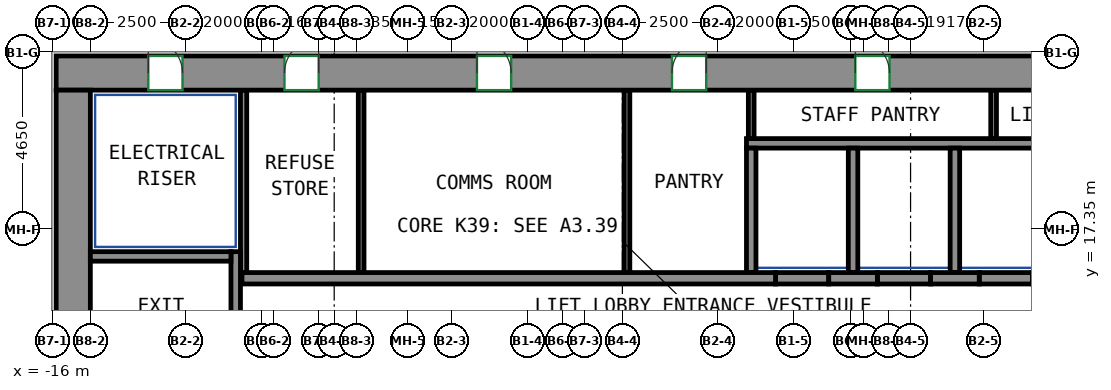
"""IFC4 building model, lengths in metres.
Left out: names, types, materials, properties, quantities, classifications, styles, units other than length and angle.
Written with IfcOpenShell. Run it as: python <this file> out.ifc"""

import sys

from ifc_helpers import new_model, si_unit, direction, frame, frame_2d, origin, place, context, subcontext, project, spatial, rectangle, extrude, source, transform, mapped, element, fill, save


model = new_model("IFC4")
c1 = context("Model", 3, precision=1e-05, world=origin(), true_north=direction((0.0, 1.0)))
c2 = subcontext(c1, "Body", "Model", "MODEL_VIEW")
j1 = project(units=[si_unit("LENGTHUNIT", "METRE"), si_unit("PLANEANGLEUNIT", "RADIAN")], contexts=[c1])
p1 = place(None, origin())
s1 = spatial("IfcSite", under=j1, at=p1, CompositionType="ELEMENT")
p2 = place(p1, origin())
s2 = spatial("IfcBuilding", under=s1, at=p2, CompositionType="ELEMENT")
p3 = place(p2, frame((0.0, 0.0, 164.3)))
s3 = spatial("IfcBuildingStorey", under=s2, at=p3, CompositionType="ELEMENT", Elevation=164.3)
m1 = source(origin(), c2, "Body", "SweptSolid", [
    extrude(rectangle(XDim=33.9, YDim=0.9, at=frame_2d((16.95, 0.0))), origin(), (0.0, 0.0, 1.0), 3.8),
])
p4 = place(p3, frame((-15.9, 21.45, 0.0), z_axis=(0.0, 0.0, 1.0), x_axis=(1.0, 0.0, 0.0)))
e1 = element("IfcWall", 1, at=p4, inside=s3, PredefinedType="SHEAR", context=c2, shape_type="MappedRepresentation", body=[
    mapped(m1, transform((0.0, 0.0, 0.0))),
])
p5 = place(p4, frame((6.008, 0.0, 0.0)))
e2 = element("IfcOpeningElement", 2, at=p5, cuts=e1, PredefinedType="OPENING", context=c2, shape_type="SweptSolid", body=[
    extrude(rectangle(XDim=0.9, YDim=2.1, at=frame_2d((0.45, 1.05))), frame((0.0, 0.46, 0.0), z_axis=(0.0, -1.0, 0.0), x_axis=(1.0, 0.0, 0.0)), (0.0, 0.0, 1.0), 0.92),
])
p6 = place(p4, frame((11.073, 0.0, 0.0)))
e3 = element("IfcOpeningElement", 3, at=p6, cuts=e1, PredefinedType="OPENING", context=c2, shape_type="SweptSolid", body=[
    extrude(rectangle(XDim=0.9, YDim=2.1, at=frame_2d((0.45, 1.05))), frame((0.0, 0.46, 0.0), z_axis=(0.0, -1.0, 0.0), x_axis=(1.0, 0.0, 0.0)), (0.0, 0.0, 1.0), 0.92),
])
p7 = place(p4, frame((16.205, 0.0, 0.0)))
e4 = element("IfcOpeningElement", 4, at=p7, cuts=e1, PredefinedType="OPENING", context=c2, shape_type="SweptSolid", body=[
    extrude(rectangle(XDim=0.9, YDim=2.1, at=frame_2d((0.45, 1.05))), frame((0.0, 0.46, 0.0), z_axis=(0.0, -1.0, 0.0), x_axis=(1.0, 0.0, 0.0)), (0.0, 0.0, 1.0), 0.92),
])
p8 = place(p4, frame((21.029, 0.0, 0.0)))
e5 = element("IfcOpeningElement", 5, at=p8, cuts=e1, PredefinedType="OPENING", context=c2, shape_type="SweptSolid", body=[
    extrude(rectangle(XDim=0.9, YDim=2.1, at=frame_2d((0.45, 1.05))), frame((0.0, 0.46, 0.0), z_axis=(0.0, -1.0, 0.0), x_axis=(1.0, 0.0, 0.0)), (0.0, 0.0, 1.0), 0.92),
])
p9 = place(p4, frame((26.389, 0.0, 0.0)))
e6 = element("IfcOpeningElement", 6, at=p9, cuts=e1, PredefinedType="OPENING", context=c2, shape_type="SweptSolid", body=[
    extrude(rectangle(XDim=0.9, YDim=2.1, at=frame_2d((0.45, 1.05))), frame((0.0, 0.46, 0.0), z_axis=(0.0, -1.0, 0.0), x_axis=(1.0, 0.0, 0.0)), (0.0, 0.0, 1.0), 0.92),
])
p10 = place(p4, frame((2.425, 0.0, 0.0)))
e7 = element("IfcOpeningElement", 7, at=p10, cuts=e1, PredefinedType="OPENING", context=c2, shape_type="SweptSolid", body=[
    extrude(rectangle(XDim=0.9, YDim=2.1, at=frame_2d((0.45, 1.05))), frame((0.0, 0.46, 0.0), z_axis=(0.0, -1.0, 0.0), x_axis=(1.0, 0.0, 0.0)), (0.0, 0.0, 1.0), 0.92),
])
p11 = place(p4, frame((30.575, 0.0, 0.0)))
e8 = element("IfcOpeningElement", 8, at=p11, cuts=e1, PredefinedType="OPENING", context=c2, shape_type="SweptSolid", body=[
    extrude(rectangle(XDim=0.9, YDim=2.1, at=frame_2d((0.45, 1.05))), frame((0.0, 0.46, 0.0), z_axis=(0.0, -1.0, 0.0), x_axis=(1.0, 0.0, 0.0)), (0.0, 0.0, 1.0), 0.92),
])
m2 = source(origin(), c2, "Body", "SweptSolid", [
    extrude(rectangle(XDim=12.0, YDim=0.9, at=frame_2d((6.0, 0.0))), origin(), (0.0, 0.0, 1.0), 3.8),
])
p12 = place(p3, frame((-15.45, 9.0, 0.0), z_axis=(0.0, 0.0, 1.0), x_axis=(0.0, 1.0, 0.0)))
e9 = element("IfcWall", 9, at=p12, inside=s3, PredefinedType="SHEAR", context=c2, shape_type="MappedRepresentation", body=[
    mapped(m2, transform((0.0, 0.0, 0.0))),
])
m3 = source(origin(), c2, "Body", "SweptSolid", [
    extrude(rectangle(XDim=7.75, YDim=0.25, at=frame_2d((3.875, 0.0))), origin(), (0.0, 0.0, 1.0), 3.8),
])
p13 = place(p3, frame((-11.175, 9.0, 0.0), z_axis=(0.0, 0.0, 1.0), x_axis=(0.0, 1.0, 0.0)))
e10 = element("IfcWall", 10, at=p13, inside=s3, PredefinedType="SHEAR", context=c2, shape_type="MappedRepresentation", body=[
    mapped(m3, transform((0.0, 0.0, 0.0))),
])
m4 = source(origin(), c2, "Body", "SweptSolid", [
    extrude(rectangle(XDim=3.7, YDim=0.25, at=frame_2d((1.85, 0.0))), origin(), (0.0, 0.0, 1.0), 3.8),
])
p14 = place(p3, frame((-15.0, 16.625, 0.0), z_axis=(0.0, 0.0, 1.0), x_axis=(1.0, 0.0, 0.0)))
e11 = element("IfcWall", 11, at=p14, inside=s3, PredefinedType="SHEAR", context=c2, shape_type="MappedRepresentation", body=[
    mapped(m4, transform((0.0, 0.0, 0.0))),
])
m5 = source(origin(), c2, "Body", "SweptSolid", [
    extrude(rectangle(XDim=14.04, YDim=0.3, at=frame_2d((7.02, 0.0))), origin(), (0.0, 0.0, 1.0), 3.8),
])
p15 = place(p3, frame((-11.01, 16.05, 0.0), z_axis=(0.0, 0.0, 1.0), x_axis=(1.0, 0.0, 0.0)))
e12 = element("IfcWall", 12, at=p15, inside=s3, PredefinedType="SHEAR", context=c2, shape_type="MappedRepresentation", body=[
    mapped(m5, transform((0.0, 0.0, 0.0))),
])
m6 = source(origin(), c2, "Body", "SweptSolid", [
    extrude(rectangle(XDim=1.28, YDim=0.3, at=frame_2d((0.64, 0.0))), origin(), (0.0, 0.0, 1.0), 3.8),
])
p16 = place(p3, frame((4.43, 16.05, 0.0), z_axis=(0.0, 0.0, 1.0), x_axis=(1.0, 0.0, 0.0)))
e13 = element("IfcWall", 13, at=p16, inside=s3, PredefinedType="SHEAR", context=c2, shape_type="MappedRepresentation", body=[
    mapped(m6, transform((0.0, 0.0, 0.0))),
])
m7 = source(origin(), c2, "Body", "SweptSolid", [
    extrude(rectangle(XDim=1.28, YDim=0.3, at=frame_2d((0.64, 0.0))), origin(), (0.0, 0.0, 1.0), 3.8),
])
p17 = place(p3, frame((7.11, 16.05, 0.0), z_axis=(0.0, 0.0, 1.0), x_axis=(1.0, 0.0, 0.0)))
e14 = element("IfcWall", 14, at=p17, inside=s3, PredefinedType="SHEAR", context=c2, shape_type="MappedRepresentation", body=[
    mapped(m7, transform((0.0, 0.0, 0.0))),
])
m8 = source(origin(), c2, "Body", "SweptSolid", [
    extrude(rectangle(XDim=1.4, YDim=0.3, at=frame_2d((0.7, 0.0))), origin(), (0.0, 0.0, 1.0), 3.8),
])
p18 = place(p3, frame((3.03, 16.05, 0.0), z_axis=(0.0, 0.0, 1.0), x_axis=(1.0, 0.0, 0.0)))
e15 = element("IfcWall", 15, at=p18, inside=s3, PredefinedType="PARTITIONING", context=c2, shape_type="MappedRepresentation", body=[
    mapped(m8, transform((0.0, 0.0, 0.0))),
])
m9 = source(origin(), c2, "Body", "SweptSolid", [
    extrude(rectangle(XDim=1.4, YDim=0.3, at=frame_2d((0.7, 0.0))), origin(), (0.0, 0.0, 1.0), 3.8),
])
for number, where, z_axis, x_axis in (
    (16, (5.71, 16.05, 0.0), (0.0, 0.0, 1.0), (1.0, 0.0, 0.0)),
    (17, (8.39, 16.05, 0.0), (0.0, 0.0, 1.0), (1.0, 0.0, 0.0)),
):
    element("IfcWall", number, at=place(p3, frame(where, z_axis=z_axis, x_axis=x_axis)), inside=s3, PredefinedType="PARTITIONING", context=c2, shape_type="MappedRepresentation", body=[
        mapped(m9, transform((0.0, 0.0, 0.0))),
    ])
m10 = source(origin(), c2, "Body", "SweptSolid", [
    extrude(rectangle(XDim=10.97, YDim=0.25, at=frame_2d((5.485, 0.0))), origin(), (0.0, 0.0, 1.0), 3.8),
])
p19 = place(p3, frame((2.265, 19.6, 0.0), z_axis=(0.0, 0.0, 1.0), x_axis=(1.0, 0.0, 0.0)))
e18 = element("IfcWall", 18, at=p19, inside=s3, PredefinedType="PARTITIONING", context=c2, shape_type="MappedRepresentation", body=[
    mapped(m10, transform((0.0, 0.0, 0.0))),
])
m11 = source(origin(), c2, "Body", "SweptSolid", [
    extrude(rectangle(XDim=4.8, YDim=0.165, at=frame_2d((2.4, 0.0))), origin(), (0.0, 0.0, 1.0), 3.8),
])
p20 = place(p3, frame((-10.968, 16.2, 0.0), z_axis=(0.0, 0.0, 1.0), x_axis=(0.0, 1.0, 0.0)))
e19 = element("IfcWall", 19, at=p20, inside=s3, PredefinedType="PARTITIONING", context=c2, shape_type="MappedRepresentation", body=[
    mapped(m11, transform((0.0, 0.0, 0.0))),
])
m12 = source(origin(), c2, "Body", "SweptSolid", [
    extrude(rectangle(XDim=3.275, YDim=0.25, at=frame_2d((1.638, 0.0))), origin(), (0.0, 0.0, 1.0), 3.8),
])
for number, where, z_axis, x_axis in (
    (20, (2.39, 16.2, 0.0), (0.0, 0.0, 1.0), (0.0, 1.0, 0.0)),
    (21, (5.07, 16.2, 0.0), (0.0, 0.0, 1.0), (0.0, 1.0, 0.0)),
    (22, (7.75, 16.2, 0.0), (0.0, 0.0, 1.0), (0.0, 1.0, 0.0)),
):
    element("IfcWall", number, at=place(p3, frame(where, z_axis=z_axis, x_axis=x_axis)), inside=s3, PredefinedType="PARTITIONING", context=c2, shape_type="MappedRepresentation", body=[
        mapped(m12, transform((0.0, 0.0, 0.0))),
    ])
m13 = source(origin(), c2, "Body", "SweptSolid", [
    extrude(rectangle(XDim=4.8, YDim=0.15, at=frame_2d((2.4, 0.0))), origin(), (0.0, 0.0, 1.0), 3.8),
])
for number, where, z_axis, x_axis in (
    (23, (-7.875, 16.2, 0.0), (0.0, 0.0, 1.0), (0.0, 1.0, 0.0)),
    (24, (-0.88, 16.2, 0.0), (0.0, 0.0, 1.0), (0.0, 1.0, 0.0)),
):
    element("IfcWall", number, at=place(p3, frame(where, z_axis=z_axis, x_axis=x_axis)), inside=s3, PredefinedType="PARTITIONING", context=c2, shape_type="MappedRepresentation", body=[
        mapped(m13, transform((0.0, 0.0, 0.0))),
    ])
m14 = source(origin(), c2, "Body", "SweptSolid", [
    extrude(rectangle(XDim=1.275, YDim=0.15, at=frame_2d((0.637, 0.0))), origin(), (0.0, 0.0, 1.0), 3.8),
])
for number, where, z_axis, x_axis in (
    (25, (2.39, 19.725, 0.0), (0.0, 0.0, 1.0), (0.0, 1.0, 0.0)),
    (26, (8.768, 19.725, 0.0), (0.0, 0.0, 1.0), (0.0, 1.0, 0.0)),
):
    element("IfcWall", number, at=place(p3, frame(where, z_axis=z_axis, x_axis=x_axis)), inside=s3, PredefinedType="PARTITIONING", context=c2, shape_type="MappedRepresentation", body=[
        mapped(m14, transform((0.0, 0.0, 0.0))),
    ])
p21 = place(p5, origin())
e27 = element("IfcDoor", 27, at=p21, inside=s3, OperationType="SINGLE_SWING_RIGHT", PredefinedType="DOOR", context=c2, shape_type="SweptSolid", body=[
    extrude(rectangle(XDim=0.9, YDim=2.1, at=frame_2d((0.45, 1.05))), frame((0.0, -0.305, 0.0), z_axis=(0.0, -1.0, 0.0), x_axis=(1.0, 0.0, 0.0)), (0.0, 0.0, 1.0), 0.05),
])
fill(e2, e27)
p22 = place(p6, origin())
e28 = element("IfcDoor", 28, at=p22, inside=s3, OperationType="SINGLE_SWING_LEFT", PredefinedType="DOOR", context=c2, shape_type="SweptSolid", body=[
    extrude(rectangle(XDim=0.9, YDim=2.1, at=frame_2d((0.45, 1.05))), frame((0.0, -0.305, 0.0), z_axis=(0.0, -1.0, 0.0), x_axis=(1.0, 0.0, 0.0)), (0.0, 0.0, 1.0), 0.05),
])
fill(e3, e28)
p23 = place(p7, origin())
e29 = element("IfcDoor", 29, at=p23, inside=s3, OperationType="SINGLE_SWING_RIGHT", PredefinedType="DOOR", context=c2, shape_type="SweptSolid", body=[
    extrude(rectangle(XDim=0.9, YDim=2.1, at=frame_2d((0.45, 1.05))), frame((0.0, -0.305, 0.0), z_axis=(0.0, -1.0, 0.0), x_axis=(1.0, 0.0, 0.0)), (0.0, 0.0, 1.0), 0.05),
])
fill(e4, e29)
p24 = place(p8, origin())
e30 = element("IfcDoor", 30, at=p24, inside=s3, OperationType="SINGLE_SWING_LEFT", PredefinedType="DOOR", context=c2, shape_type="SweptSolid", body=[
    extrude(rectangle(XDim=0.9, YDim=2.1, at=frame_2d((0.45, 1.05))), frame((0.0, -0.305, 0.0), z_axis=(0.0, -1.0, 0.0), x_axis=(1.0, 0.0, 0.0)), (0.0, 0.0, 1.0), 0.05),
])
fill(e5, e30)
p25 = place(p10, origin())
e31 = element("IfcDoor", 31, at=p25, inside=s3, OperationType="SINGLE_SWING_LEFT", PredefinedType="DOOR", context=c2, shape_type="SweptSolid", body=[
    extrude(rectangle(XDim=0.9, YDim=2.1, at=frame_2d((0.45, 1.05))), frame((0.0, -0.305, 0.0), z_axis=(0.0, -1.0, 0.0), x_axis=(1.0, 0.0, 0.0)), (0.0, 0.0, 1.0), 0.05),
])
fill(e7, e31)
save(model, sys.argv[1])
